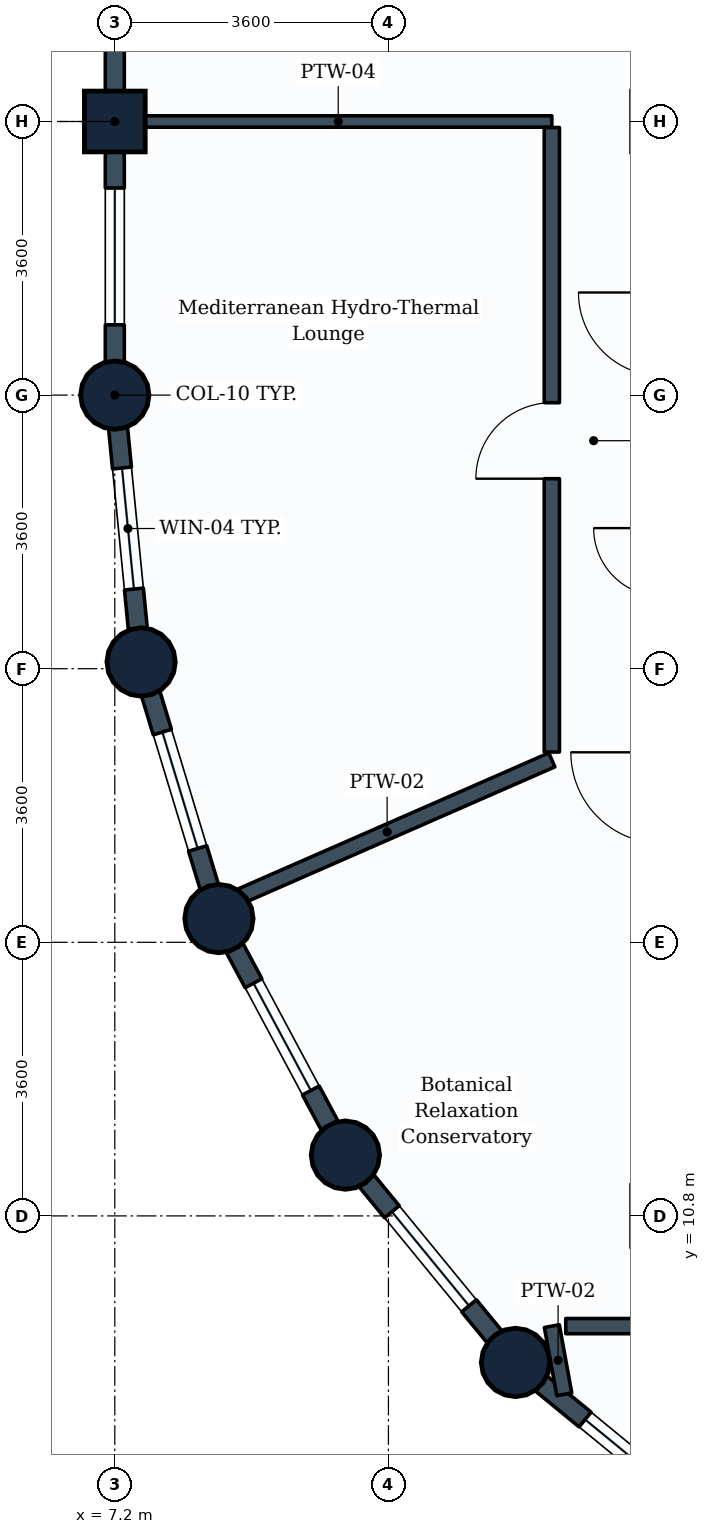
"""IFC4 building model, lengths in metres.
Left out: names, types, materials, properties, quantities, classifications, styles, units other than length and angle.
Written with IfcOpenShell. Run it as: python <this file> out.ifc"""

import sys

from ifc_helpers import new_model, si_unit, direction, frame, frame_2d, origin, origin_2d, place, context, subcontext, project, spatial, rectangle, circle, extrude, element, fill, save


model = new_model("IFC4")
c1 = context("Model", 3, precision=1e-05, world=origin(), true_north=direction((0.0, 1.0)))
c2 = subcontext(c1, "Body", "Model", "MODEL_VIEW")
j1 = project(units=[si_unit("LENGTHUNIT", "METRE"), si_unit("PLANEANGLEUNIT", "RADIAN")], contexts=[c1])
p1 = place(None, origin())
s1 = spatial("IfcSite", under=j1, at=p1, CompositionType="ELEMENT")
p2 = place(p1, origin())
s2 = spatial("IfcBuilding", under=s1, at=p2, CompositionType="ELEMENT")
p3 = place(p2, frame((0.0, 0.0, 242.6)))
s3 = spatial("IfcBuildingStorey", under=s2, at=p3, CompositionType="ELEMENT", Elevation=242.6)
p4 = place(p3, frame((7.2, 21.6, 0.0), z_axis=(0.0, 0.0, 1.0), x_axis=(1.0, 0.0, 0.0)))
e1 = element("IfcColumn", 1, at=p4, inside=s3, PredefinedType="COLUMN", context=c2, shape_type="SweptSolid", body=[
    extrude(circle(Radius=0.45, at=origin_2d()), origin(), (0.0, 0.0, 1.0), 3.6),
])
p5 = place(p3, frame((7.2, 25.2, 0.0), z_axis=(0.0, 0.0, 1.0), x_axis=(0.0, 1.0, 0.0)))
e2 = element("IfcColumn", 2, at=p5, inside=s3, PredefinedType="COLUMN", context=c2, shape_type="SweptSolid", body=[
    extrude(rectangle(XDim=0.8, YDim=0.8, at=origin_2d()), origin(), (0.0, 0.0, 1.0), 3.6),
])
for number, where, z_axis, x_axis in (
    (3, (7.546, 18.088, 0.0), (0.0, 0.0, 1.0), (1.0, 0.0, 0.0)),
    (4, (8.57, 14.712, 0.0), (0.0, 0.0, 1.0), (1.0, 0.0, 0.0)),
    (5, (10.234, 11.6, 0.0), (0.0, 0.0, 1.0), (1.0, 0.0, 0.0)),
    (6, (12.472, 8.872, 0.0), (0.0, 0.0, 1.0), (1.0, 0.0, 0.0)),
):
    element("IfcColumn", number, at=place(p3, frame(where, z_axis=z_axis, x_axis=x_axis)), inside=s3, PredefinedType="COLUMN", context=c2, shape_type="SweptSolid", body=[
        extrude(circle(Radius=0.45, at=origin_2d()), origin(), (0.0, 0.0, 1.0), 3.6),
    ])
p6 = place(p3, frame((7.2, 25.2, 0.0), z_axis=(0.0, 0.0, 1.0), x_axis=(0.0, 1.0, 0.0)))
e7 = element("IfcWall", 7, at=p6, inside=s3, PredefinedType="STANDARD", context=c2, shape_type="SweptSolid", body=[
    extrude(rectangle(XDim=3.6, YDim=0.25, at=frame_2d((1.8, 0.0))), origin(), (0.0, 0.0, 1.0), 2.83),
])
p7 = place(p3, frame((7.2, 21.6, 0.0), z_axis=(0.0, 0.0, 1.0), x_axis=(0.0, 1.0, 0.0)))
e8 = element("IfcWall", 8, at=p7, inside=s3, PredefinedType="STANDARD", context=c2, shape_type="SweptSolid", body=[
    extrude(rectangle(XDim=3.6, YDim=0.25, at=frame_2d((1.8, 0.0))), origin(), (0.0, 0.0, 1.0), 2.83),
])
p8 = place(p7, frame((0.925, 0.0, 0.85)))
e9 = element("IfcOpeningElement", 9, at=p8, cuts=e8, PredefinedType="OPENING", context=c2, shape_type="SweptSolid", body=[
    extrude(rectangle(XDim=1.8, YDim=1.35, at=frame_2d((0.9, 0.675))), frame((0.0, 0.135, 0.0), z_axis=(0.0, -1.0, 0.0), x_axis=(1.0, 0.0, 0.0)), (0.0, 0.0, 1.0), 0.27),
])
p9 = place(p3, frame((7.546, 18.088, 0.0), z_axis=(0.0, 0.0, 1.0), x_axis=(-0.09802417461, 0.995184033831, 0.0)))
e10 = element("IfcWall", 10, at=p9, inside=s3, PredefinedType="STANDARD", context=c2, shape_type="SweptSolid", body=[
    extrude(rectangle(XDim=3.529, YDim=0.25, at=frame_2d((1.765, 0.0))), origin(), (0.0, 0.0, 1.0), 2.83),
])
p10 = place(p9, frame((0.965, 0.0, 0.85)))
e11 = element("IfcOpeningElement", 11, at=p10, cuts=e10, PredefinedType="OPENING", context=c2, shape_type="SweptSolid", body=[
    extrude(rectangle(XDim=1.6, YDim=1.35, at=frame_2d((0.8, 0.675))), frame((0.0, 0.135, 0.0), z_axis=(0.0, -1.0, 0.0), x_axis=(1.0, 0.0, 0.0)), (0.0, 0.0, 1.0), 0.27),
])
p11 = place(p3, frame((8.57, 14.712, 0.0), z_axis=(0.0, 0.0, 1.0), x_axis=(-0.290305086481, 0.956934144423, 0.0)))
e12 = element("IfcWall", 12, at=p11, inside=s3, PredefinedType="STANDARD", context=c2, shape_type="SweptSolid", body=[
    extrude(rectangle(XDim=3.528, YDim=0.25, at=frame_2d((1.764, 0.0))), origin(), (0.0, 0.0, 1.0), 2.83),
])
p12 = place(p11, frame((0.964, 0.0, 0.85)))
e13 = element("IfcOpeningElement", 13, at=p12, cuts=e12, PredefinedType="OPENING", context=c2, shape_type="SweptSolid", body=[
    extrude(rectangle(XDim=1.6, YDim=1.35, at=frame_2d((0.8, 0.675))), frame((0.0, 0.135, 0.0), z_axis=(0.0, -1.0, 0.0), x_axis=(1.0, 0.0, 0.0)), (0.0, 0.0, 1.0), 0.27),
])
p13 = place(p3, frame((10.234, 11.6, 0.0), z_axis=(0.0, 0.0, 1.0), x_axis=(-0.47151087309, 0.881860247748, 0.0)))
e14 = element("IfcWall", 14, at=p13, inside=s3, PredefinedType="STANDARD", context=c2, shape_type="SweptSolid", body=[
    extrude(rectangle(XDim=3.529, YDim=0.25, at=frame_2d((1.764, 0.0))), origin(), (0.0, 0.0, 1.0), 2.83),
])
p14 = place(p13, frame((0.964, 0.0, 0.85)))
e15 = element("IfcOpeningElement", 15, at=p14, cuts=e14, PredefinedType="OPENING", context=c2, shape_type="SweptSolid", body=[
    extrude(rectangle(XDim=1.6, YDim=1.35, at=frame_2d((0.8, 0.675))), frame((0.0, 0.135, 0.0), z_axis=(0.0, -1.0, 0.0), x_axis=(1.0, 0.0, 0.0)), (0.0, 0.0, 1.0), 0.27),
])
p15 = place(p3, frame((12.472, 8.872, 0.0), z_axis=(0.0, 0.0, 1.0), x_axis=(-0.634258295121, 0.773121216285, 0.0)))
e16 = element("IfcWall", 16, at=p15, inside=s3, PredefinedType="STANDARD", context=c2, shape_type="SweptSolid", body=[
    extrude(rectangle(XDim=3.529, YDim=0.25, at=frame_2d((1.764, 0.0))), origin(), (0.0, 0.0, 1.0), 2.83),
])
p16 = place(p15, frame((0.964, 0.0, 0.85)))
e17 = element("IfcOpeningElement", 17, at=p16, cuts=e16, PredefinedType="OPENING", context=c2, shape_type="SweptSolid", body=[
    extrude(rectangle(XDim=1.6, YDim=1.35, at=frame_2d((0.8, 0.675))), frame((0.0, 0.135, 0.0), z_axis=(0.0, -1.0, 0.0), x_axis=(1.0, 0.0, 0.0)), (0.0, 0.0, 1.0), 0.27),
])
p17 = place(p3, frame((15.2, 6.634, 0.0), z_axis=(0.0, 0.0, 1.0), x_axis=(-0.773121216285, 0.634258295121, 0.0)))
e18 = element("IfcWall", 18, at=p17, inside=s3, PredefinedType="STANDARD", context=c2, shape_type="SweptSolid", body=[
    extrude(rectangle(XDim=3.529, YDim=0.25, at=frame_2d((1.764, 0.0))), origin(), (0.0, 0.0, 1.0), 2.83),
])
p18 = place(p17, frame((0.744, 0.0, 0.85)))
e19 = element("IfcOpeningElement", 19, at=p18, cuts=e18, PredefinedType="OPENING", context=c2, shape_type="SweptSolid", body=[
    extrude(rectangle(XDim=1.6, YDim=1.35, at=frame_2d((0.8, 0.675))), frame((0.0, 0.135, 0.0), z_axis=(0.0, -1.0, 0.0), x_axis=(1.0, 0.0, 0.0)), (0.0, 0.0, 1.0), 0.27),
])
p19 = place(p3, frame((7.329, 25.2, 0.0), z_axis=(0.0, 0.0, 1.0), x_axis=(1.0, 0.0, 0.0)))
e20 = element("IfcWall", 20, at=p19, inside=s3, PredefinedType="PARTITIONING", context=c2, shape_type="SweptSolid", body=[
    extrude(rectangle(XDim=5.621, YDim=0.15, at=frame_2d((2.811, 0.0))), origin(), (0.0, 0.0, 1.0), 3.335),
])
p20 = place(p3, frame((12.95, 16.8, 0.0), z_axis=(0.0, 0.0, 1.0), x_axis=(-0.916090997314, -0.400970428635, 0.0)))
e21 = element("IfcWall", 21, at=p20, inside=s3, PredefinedType="PARTITIONING", context=c2, shape_type="SweptSolid", body=[
    extrude(rectangle(XDim=4.731, YDim=0.2, at=frame_2d((2.365, 0.0))), origin(), (0.0, 0.0, 1.0), 2.83),
])
p21 = place(p3, frame((12.95, 9.35, 0.0), z_axis=(0.0, 0.0, 1.0), x_axis=(0.179827308786, -0.983698195086, 0.0)))
e22 = element("IfcWall", 22, at=p21, inside=s3, PredefinedType="PARTITIONING", context=c2, shape_type="SweptSolid", body=[
    extrude(rectangle(XDim=0.912, YDim=0.2, at=frame_2d((0.456, 0.0))), origin(), (0.0, 0.0, 1.0), 2.83),
])
p22 = place(p3, frame((12.95, 16.904, 0.0), z_axis=(0.0, 0.0, 1.0), x_axis=(0.0, 1.0, 0.0)))
e23 = element("IfcWall", 23, at=p22, inside=s3, PredefinedType="PARTITIONING", context=c2, shape_type="SweptSolid", body=[
    extrude(rectangle(XDim=8.217, YDim=0.2, at=frame_2d((4.108, 0.0))), origin(), (0.0, 0.0, 1.0), 3.02),
])
p23 = place(p22, frame((3.596, 0.0, 0.0)))
e24 = element("IfcOpeningElement", 24, at=p23, cuts=e23, PredefinedType="OPENING", context=c2, shape_type="SweptSolid", body=[
    extrude(rectangle(XDim=1.0, YDim=2.1, at=frame_2d((0.5, 1.05))), frame((0.0, 0.11, 0.0), z_axis=(0.0, -1.0, 0.0), x_axis=(1.0, 0.0, 0.0)), (0.0, 0.0, 1.0), 0.22),
])
p24 = place(p3, frame((13.133, 9.35, 0.0), z_axis=(0.0, 0.0, 1.0), x_axis=(1.0, 0.0, 0.0)))
e25 = element("IfcWall", 25, at=p24, inside=s3, PredefinedType="PARTITIONING", context=c2, shape_type="SweptSolid", body=[
    extrude(rectangle(XDim=7.163, YDim=0.2, at=frame_2d((3.582, 0.0))), origin(), (0.0, 0.0, 1.0), 3.02),
])
p25 = place(p24, frame((4.078, 0.0, 0.0)))
e26 = element("IfcOpeningElement", 26, at=p25, cuts=e25, PredefinedType="OPENING", context=c2, shape_type="SweptSolid", body=[
    extrude(rectangle(XDim=1.0, YDim=2.1, at=frame_2d((0.5, 1.05))), frame((0.0, 0.11, 0.0), z_axis=(0.0, -1.0, 0.0), x_axis=(1.0, 0.0, 0.0)), (0.0, 0.0, 1.0), 0.22),
])
p26 = place(p8, origin())
e27 = element("IfcWindow", 27, at=p26, inside=s3, PartitioningType="SINGLE_PANEL", PredefinedType="WINDOW", context=c2, shape_type="SweptSolid", body=[
    extrude(rectangle(XDim=1.8, YDim=1.35, at=frame_2d((0.9, 0.675))), frame((0.0, 0.03, 0.0), z_axis=(0.0, -1.0, 0.0), x_axis=(1.0, 0.0, 0.0)), (0.0, 0.0, 1.0), 0.06),
])
fill(e9, e27)
p27 = place(p10, origin())
e28 = element("IfcWindow", 28, at=p27, inside=s3, PartitioningType="SINGLE_PANEL", PredefinedType="WINDOW", context=c2, shape_type="SweptSolid", body=[
    extrude(rectangle(XDim=1.6, YDim=1.35, at=frame_2d((0.8, 0.675))), frame((0.0, 0.03, 0.0), z_axis=(0.0, -1.0, 0.0), x_axis=(1.0, 0.0, 0.0)), (0.0, 0.0, 1.0), 0.06),
])
fill(e11, e28)
p28 = place(p12, origin())
e29 = element("IfcWindow", 29, at=p28, inside=s3, PartitioningType="SINGLE_PANEL", PredefinedType="WINDOW", context=c2, shape_type="SweptSolid", body=[
    extrude(rectangle(XDim=1.6, YDim=1.35, at=frame_2d((0.8, 0.675))), frame((0.0, 0.03, 0.0), z_axis=(0.0, -1.0, 0.0), x_axis=(1.0, 0.0, 0.0)), (0.0, 0.0, 1.0), 0.06),
])
fill(e13, e29)
p29 = place(p14, origin())
e30 = element("IfcWindow", 30, at=p29, inside=s3, PartitioningType="SINGLE_PANEL", PredefinedType="WINDOW", context=c2, shape_type="SweptSolid", body=[
    extrude(rectangle(XDim=1.6, YDim=1.35, at=frame_2d((0.8, 0.675))), frame((0.0, 0.03, 0.0), z_axis=(0.0, -1.0, 0.0), x_axis=(1.0, 0.0, 0.0)), (0.0, 0.0, 1.0), 0.06),
])
fill(e15, e30)
p30 = place(p16, origin())
e31 = element("IfcWindow", 31, at=p30, inside=s3, PartitioningType="SINGLE_PANEL", PredefinedType="WINDOW", context=c2, shape_type="SweptSolid", body=[
    extrude(rectangle(XDim=1.6, YDim=1.35, at=frame_2d((0.8, 0.675))), frame((0.0, 0.03, 0.0), z_axis=(0.0, -1.0, 0.0), x_axis=(1.0, 0.0, 0.0)), (0.0, 0.0, 1.0), 0.06),
])
fill(e17, e31)
p31 = place(p18, origin())
e32 = element("IfcWindow", 32, at=p31, inside=s3, PartitioningType="SINGLE_PANEL", PredefinedType="WINDOW", context=c2, shape_type="SweptSolid", body=[
    extrude(rectangle(XDim=1.6, YDim=1.35, at=frame_2d((0.8, 0.675))), frame((0.0, 0.03, 0.0), z_axis=(0.0, -1.0, 0.0), x_axis=(1.0, 0.0, 0.0)), (0.0, 0.0, 1.0), 0.06),
])
fill(e19, e32)
p32 = place(p23, origin())
e33 = element("IfcDoor", 33, at=p32, inside=s3, OperationType="SINGLE_SWING_LEFT", PredefinedType="DOOR", context=c2, shape_type="SweptSolid", body=[
    extrude(rectangle(XDim=1.0, YDim=2.1, at=frame_2d((0.5, 1.05))), frame((0.0, 0.025, 0.0), z_axis=(0.0, -1.0, 0.0), x_axis=(1.0, 0.0, 0.0)), (0.0, 0.0, 1.0), 0.05),
])
fill(e24, e33)
save(model, sys.argv[1])
